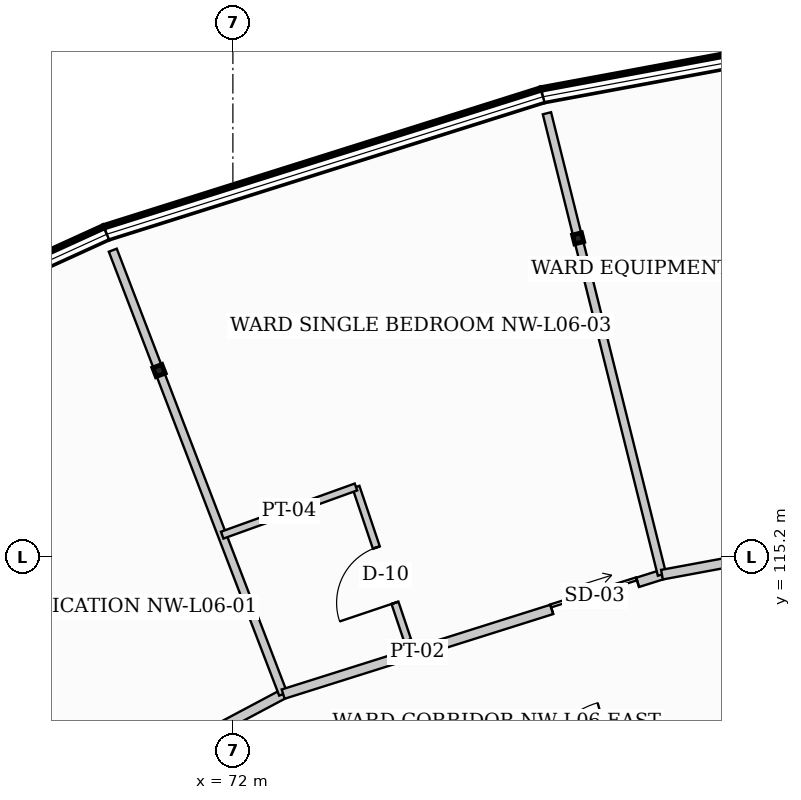
"""IFC4 building model, lengths in metres.
Left out: names, types, materials, properties, quantities, classifications, styles, units other than length and angle.
Written with IfcOpenShell. Run it as: python <this file> out.ifc"""

import sys

from ifc_helpers import new_model, si_unit, direction, frame, frame_2d, origin, origin_2d, place, context, subcontext, project, spatial, rectangle, hollow_rectangle, i_section, extrude, element, fill, save


model = new_model("IFC4")
c1 = context("Model", 3, precision=1e-05, world=origin(), true_north=direction((0.0, 1.0)))
c2 = subcontext(c1, "Body", "Model", "MODEL_VIEW")
j1 = project(units=[si_unit("LENGTHUNIT", "METRE"), si_unit("PLANEANGLEUNIT", "RADIAN")], contexts=[c1])
p1 = place(None, origin())
s1 = spatial("IfcSite", under=j1, at=p1, CompositionType="ELEMENT")
p2 = place(p1, origin())
s2 = spatial("IfcBuilding", under=s1, at=p2, CompositionType="ELEMENT")
p3 = place(p2, frame((0.0, 0.0, 26.1)))
s3 = spatial("IfcBuildingStorey", under=s2, at=p3, CompositionType="ELEMENT", Elevation=26.1)
p4 = place(p3, frame((70.785, 118.268, 0.0), z_axis=(0.0, 0.0, 1.0), x_axis=(-0.358367949545, 0.933580426497, 0.0)))
e1 = element("IfcColumn", 1, at=p4, inside=s3, PredefinedType="COLUMN", context=c2, shape_type="SweptSolid", body=[
    extrude(i_section(OverallWidth=0.153, OverallDepth=0.158, WebThickness=0.007, FlangeThickness=0.01, at=origin_2d()), origin(), (0.0, 0.0, 1.0), 3.9),
])
p5 = place(p3, frame((77.678, 120.442, 0.0), z_axis=(0.0, 0.0, 1.0), x_axis=(-0.2419218956, 0.970295726276, 0.0)))
e2 = element("IfcColumn", 2, at=p5, inside=s3, PredefinedType="COLUMN", context=c2, shape_type="SweptSolid", body=[
    extrude(hollow_rectangle(XDim=0.15, YDim=0.15, WallThickness=0.008, at=origin_2d()), origin(), (0.0, 0.0, 1.0), 3.9),
])
p6 = place(p3, frame((77.098, 122.77, 0.0), z_axis=(0.0, 0.0, 1.0), x_axis=(0.983242805192, 0.18230081195, 0.0)))
e3 = element("IfcWall", 3, at=p6, inside=s3, PredefinedType="STANDARD", context=c2, shape_type="SweptSolid", body=[
    extrude(rectangle(XDim=7.521, YDim=0.22, at=frame_2d((3.76, 0.0))), origin(), (0.0, 0.0, 1.0), 1.05),
])
p7 = place(p3, frame((69.925, 120.509, 0.0), z_axis=(0.0, 0.0, 1.0), x_axis=(0.953740021466, 0.300632618747, 0.0)))
e4 = element("IfcWall", 4, at=p7, inside=s3, PredefinedType="STANDARD", context=c2, shape_type="SweptSolid", body=[
    extrude(rectangle(XDim=7.521, YDim=0.22, at=frame_2d((3.76, 0.0))), origin(), (0.0, 0.0, 1.0), 1.05),
])
p8 = place(p3, frame((63.081, 117.39, 0.0), z_axis=(0.0, 0.0, 1.0), x_axis=(0.909953604353, 0.414710064895, 0.0)))
e5 = element("IfcWall", 5, at=p8, inside=s3, PredefinedType="STANDARD", context=c2, shape_type="SweptSolid", body=[
    extrude(rectangle(XDim=7.521, YDim=0.22, at=frame_2d((3.761, 0.0))), origin(), (0.0, 0.0, 1.0), 1.05),
])
p9 = place(p3, frame((64.389, 108.46, 0.0), z_axis=(0.0, 0.0, 1.0), x_axis=(0.882925792416, 0.46951256116, 0.0)))
e6 = element("IfcWall", 6, at=p9, inside=s3, PredefinedType="PARTITIONING", context=c2, shape_type="SweptSolid", body=[
    extrude(rectangle(XDim=9.557, YDim=0.16, at=frame_2d((4.778, 0.0))), origin(), (0.0, 0.0, 1.0), 2.873),
])
p10 = place(p9, frame((4.129, 0.0, 0.0)))
e7 = element("IfcOpeningElement", 7, at=p10, cuts=e6, PredefinedType="OPENING", context=c2, shape_type="SweptSolid", body=[
    extrude(rectangle(XDim=0.9, YDim=2.1, at=frame_2d((0.45, 1.05))), frame((0.0, 0.09, 0.0), z_axis=(0.0, -1.0, 0.0), x_axis=(1.0, 0.0, 0.0)), (0.0, 0.0, 1.0), 0.18),
])
p11 = place(p3, frame((72.827, 112.947, 0.0), z_axis=(0.0, 0.0, 1.0), x_axis=(-0.358342954102, 0.933590020965, 0.0)))
e8 = element("IfcWall", 8, at=p11, inside=s3, PredefinedType="PARTITIONING", context=c2, shape_type="SweptSolid", body=[
    extrude(rectangle(XDim=7.819, YDim=0.14, at=frame_2d((3.91, 0.0))), origin(), (0.0, 0.0, 1.0), 2.873),
])
p12 = place(p3, frame((74.873, 113.832, 0.0), z_axis=(0.0, 0.0, 1.0), x_axis=(-0.319199781595, 0.947687448176, 0.0)))
e9 = element("IfcWall", 9, at=p12, inside=s3, PredefinedType="PARTITIONING", context=c2, shape_type="SweptSolid", body=[
    extrude(rectangle(XDim=2.66, YDim=0.12, at=frame_2d((1.33, 0.0))), origin(), (0.0, 0.0, 1.0), 3.129),
])
p13 = place(p12, frame((0.65, 0.0, 0.0)))
e10 = element("IfcOpeningElement", 10, at=p13, cuts=e9, PredefinedType="OPENING", context=c2, shape_type="SweptSolid", body=[
    extrude(rectangle(XDim=0.96, YDim=2.06, at=frame_2d((0.48, 1.03))), frame((0.0, 0.07, 0.0), z_axis=(0.0, -1.0, 0.0), x_axis=(1.0, 0.0, 0.0)), (0.0, 0.0, 1.0), 0.14),
])
p14 = place(p3, frame((71.824, 115.561, 0.0), z_axis=(0.0, 0.0, 1.0), x_axis=(0.940886080788, 0.338723165695, 0.0)))
e11 = element("IfcWall", 11, at=p14, inside=s3, PredefinedType="PARTITIONING", context=c2, shape_type="SweptSolid", body=[
    extrude(rectangle(XDim=2.338, YDim=0.12, at=frame_2d((1.169, 0.0))), origin(), (0.0, 0.0, 1.0), 2.873),
])
p15 = place(p3, frame((72.827, 112.947, 0.0), z_axis=(0.0, 0.0, 1.0), x_axis=(0.953736183483, 0.30064479426, 0.0)))
e12 = element("IfcWall", 12, at=p15, inside=s3, PredefinedType="PARTITIONING", context=c2, shape_type="SweptSolid", body=[
    extrude(rectangle(XDim=6.532, YDim=0.16, at=frame_2d((3.266, 0.0))), origin(), (0.0, 0.0, 1.0), 2.873),
])
p16 = place(p15, frame((4.632, 0.0, 0.0)))
e13 = element("IfcOpeningElement", 13, at=p16, cuts=e12, PredefinedType="OPENING", context=c2, shape_type="SweptSolid", body=[
    extrude(rectangle(XDim=1.48, YDim=2.26, at=frame_2d((0.74, 1.13))), frame((0.0, 0.09, 0.0), z_axis=(0.0, -1.0, 0.0), x_axis=(1.0, 0.0, 0.0)), (0.0, 0.0, 1.0), 0.18),
])
p17 = place(p3, frame((79.057, 114.911, 0.0), z_axis=(0.0, 0.0, 1.0), x_axis=(-0.241911207257, 0.970298391117, 0.0)))
e14 = element("IfcWall", 14, at=p17, inside=s3, PredefinedType="PARTITIONING", context=c2, shape_type="SweptSolid", body=[
    extrude(rectangle(XDim=7.82, YDim=0.14, at=frame_2d((3.91, 0.0))), origin(), (0.0, 0.0, 1.0), 2.923),
])
p18 = place(p3, frame((79.057, 114.911, 0.0), z_axis=(0.0, 0.0, 1.0), x_axis=(0.983258469263, 0.182216307235, 0.0)))
e15 = element("IfcWall", 15, at=p18, inside=s3, PredefinedType="PARTITIONING", context=c2, shape_type="SweptSolid", body=[
    extrude(rectangle(XDim=4.61, YDim=0.16, at=frame_2d((2.305, 0.0))), origin(), (0.0, 0.0, 1.0), 2.923),
])
p19 = place(p18, frame((1.655, 0.0, 0.0)))
e16 = element("IfcOpeningElement", 16, at=p19, cuts=e15, PredefinedType="OPENING", context=c2, shape_type="SweptSolid", body=[
    extrude(rectangle(XDim=1.2, YDim=2.12, at=frame_2d((0.6, 1.06))), frame((0.0, 0.09, 0.0), z_axis=(0.0, -1.0, 0.0), x_axis=(1.0, 0.0, 0.0)), (0.0, 0.0, 1.0), 0.18),
])
p20 = place(p3, frame((79.783, 112.0, 0.0), z_axis=(0.0, 0.0, 1.0), x_axis=(0.983234305922, 0.182346646962, 0.0)))
e17 = element("IfcWall", 17, at=p20, inside=s3, PredefinedType="PARTITIONING", context=c2, shape_type="SweptSolid", body=[
    extrude(rectangle(XDim=3.872, YDim=0.16, at=frame_2d((1.936, 0.0))), origin(), (0.0, 0.0, 1.0), 2.923),
])
p21 = place(p20, frame((1.286, 0.0, 0.0)))
e18 = element("IfcOpeningElement", 18, at=p21, cuts=e17, PredefinedType="OPENING", context=c2, shape_type="SweptSolid", body=[
    extrude(rectangle(XDim=1.12, YDim=2.08, at=frame_2d((0.56, 1.04))), frame((0.0, 0.09, 0.0), z_axis=(0.0, -1.0, 0.0), x_axis=(1.0, 0.0, 0.0)), (0.0, 0.0, 1.0), 0.18),
])
p22 = place(p13, origin())
e19 = element("IfcDoor", 19, at=p22, inside=s3, OperationType="SINGLE_SWING_LEFT", PredefinedType="DOOR", context=c2, shape_type="SweptSolid", body=[
    extrude(rectangle(XDim=0.96, YDim=2.06, at=frame_2d((0.48, 1.03))), frame((0.0, 0.025, 0.0), z_axis=(0.0, -1.0, 0.0), x_axis=(1.0, 0.0, 0.0)), (0.0, 0.0, 1.0), 0.05),
])
fill(e10, e19)
p23 = place(p16, origin())
e20 = element("IfcDoor", 20, at=p23, inside=s3, OperationType="SLIDING_TO_LEFT", PredefinedType="DOOR", context=c2, shape_type="SweptSolid", body=[
    extrude(rectangle(XDim=1.48, YDim=2.26, at=frame_2d((0.74, 1.13))), frame((0.0, 0.025, 0.0), z_axis=(0.0, -1.0, 0.0), x_axis=(1.0, 0.0, 0.0)), (0.0, 0.0, 1.0), 0.05),
])
fill(e13, e20)
save(model, sys.argv[1])
